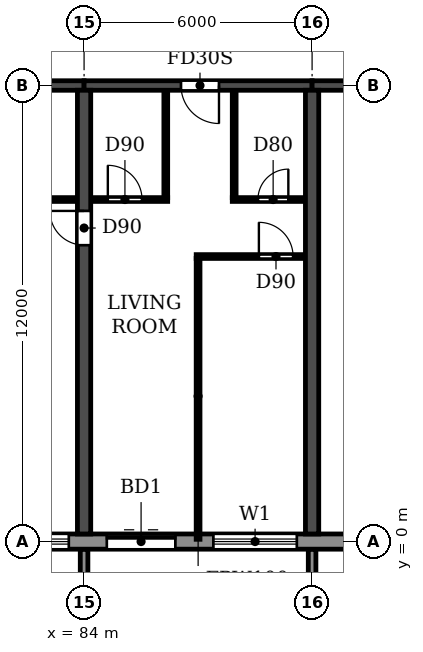
"""IFC4 building model, lengths in metres.
Left out: names, types, materials, properties, quantities, classifications, styles, units other than length and angle.
Written with IfcOpenShell. Run it as: python <this file> out.ifc"""

import sys

from ifc_helpers import new_model, si_unit, direction, frame, frame_2d, origin, place, context, subcontext, project, spatial, polyline, rectangle, outline, extrude, source, transform, mapped, element, fill, save


model = new_model("IFC4")
c1 = context("Model", 3, precision=1e-05, world=origin(), true_north=direction((0.0, 1.0)))
c2 = subcontext(c1, "Body", "Model", "MODEL_VIEW")
j1 = project(units=[si_unit("LENGTHUNIT", "METRE"), si_unit("PLANEANGLEUNIT", "RADIAN")], contexts=[c1])
p1 = place(None, origin())
s1 = spatial("IfcSite", under=j1, at=p1, CompositionType="ELEMENT")
p2 = place(p1, origin())
s2 = spatial("IfcBuilding", under=s1, at=p2, CompositionType="ELEMENT")
p3 = place(p2, frame((0.0, 0.0, 76.2)))
s3 = spatial("IfcBuildingStorey", under=s2, at=p3, CompositionType="ELEMENT", Elevation=76.2)
p4 = place(p3, frame((84.0, 0.2, 0.0), z_axis=(0.0, 0.0, 1.0), x_axis=(0.0, 1.0, 0.0)))
e1 = element("IfcWall", 1, at=p4, inside=s3, PredefinedType="SHEAR", context=c2, shape_type="SweptSolid", body=[
    extrude(rectangle(XDim=11.675, YDim=0.35, at=frame_2d((5.837, 0.0))), origin(), (0.0, 0.0, 1.0), 3.06),
])
p5 = place(p4, frame((7.6, 0.0, 0.0)))
e2 = element("IfcOpeningElement", 2, at=p5, cuts=e1, PredefinedType="OPENING", context=c2, shape_type="SweptSolid", body=[
    extrude(rectangle(XDim=0.9, YDim=2.1, at=frame_2d((0.45, 1.05))), frame((0.0, 0.185, 0.0), z_axis=(0.0, -1.0, 0.0), x_axis=(1.0, 0.0, 0.0)), (0.0, 0.0, 1.0), 0.37),
])
p6 = place(p3, frame((90.0, 0.2, 0.0), z_axis=(0.0, 0.0, 1.0), x_axis=(0.0, 1.0, 0.0)))
e3 = element("IfcWall", 3, at=p6, inside=s3, PredefinedType="SHEAR", context=c2, shape_type="SweptSolid", body=[
    extrude(rectangle(XDim=11.675, YDim=0.35, at=frame_2d((5.837, 0.0))), origin(), (0.0, 0.0, 1.0), 3.06),
])
p7 = place(p3, frame((78.0, 12.0, 0.0), z_axis=(0.0, 0.0, 1.0), x_axis=(1.0, 0.0, 0.0)))
e4 = element("IfcWall", 4, at=p7, inside=s3, PredefinedType="SHEAR", context=c2, shape_type="SweptSolid", body=[
    extrude(rectangle(XDim=6.0, YDim=0.25, at=frame_2d((3.0, 0.0))), origin(), (0.0, 0.0, 1.0), 2.46),
])
p8 = place(p3, frame((84.0, 12.0, 0.0), z_axis=(0.0, 0.0, 1.0), x_axis=(1.0, 0.0, 0.0)))
e5 = element("IfcWall", 5, at=p8, inside=s3, PredefinedType="SHEAR", context=c2, shape_type="SweptSolid", body=[
    extrude(rectangle(XDim=6.0, YDim=0.25, at=frame_2d((3.0, 0.0))), origin(), (0.0, 0.0, 1.0), 2.46),
])
p9 = place(p8, frame((2.55, 0.0, 0.0)))
e6 = element("IfcOpeningElement", 6, at=p9, cuts=e5, PredefinedType="OPENING", context=c2, shape_type="SweptSolid", body=[
    extrude(rectangle(XDim=1.0, YDim=2.1, at=frame_2d((0.5, 1.05))), frame((0.0, 0.135, 0.0), z_axis=(0.0, -1.0, 0.0), x_axis=(1.0, 0.0, 0.0)), (0.0, 0.0, 1.0), 0.27),
])
p10 = place(p3, frame((90.0, 12.0, 0.0), z_axis=(0.0, 0.0, 1.0), x_axis=(1.0, 0.0, 0.0)))
e7 = element("IfcWall", 7, at=p10, inside=s3, PredefinedType="SHEAR", context=c2, shape_type="SweptSolid", body=[
    extrude(rectangle(XDim=5.8, YDim=0.25, at=frame_2d((2.9, 0.0))), origin(), (0.0, 0.0, 1.0), 2.46),
])
p11 = place(p10, frame((2.5, 0.0, 0.0)))
e8 = element("IfcOpeningElement", 8, at=p11, cuts=e7, PredefinedType="OPENING", context=c2, shape_type="SweptSolid", body=[
    extrude(rectangle(XDim=1.0, YDim=2.1, at=frame_2d((0.5, 1.05))), frame((0.0, 0.135, 0.0), z_axis=(0.0, -1.0, 0.0), x_axis=(1.0, 0.0, 0.0)), (0.0, 0.0, 1.0), 0.27),
])
p12 = place(p3, frame((10.683, 0.0, 0.0), z_axis=(0.0, 0.0, 1.0), x_axis=(1.0, 0.0, 0.0)))
e9 = element("IfcWall", 9, at=p12, inside=s3, PredefinedType="STANDARD", context=c2, shape_type="SweptSolid", body=[
    extrude(rectangle(XDim=80.634, YDim=0.4, at=frame_2d((40.317, 0.0))), origin(), (0.0, 0.0, 1.0), 3.06),
])
p13 = place(p12, frame((1.717, 0.0, 0.9)))
e10 = element("IfcOpeningElement", 10, at=p13, cuts=e9, PredefinedType="OPENING", context=c2, shape_type="SweptSolid", body=[
    extrude(rectangle(XDim=2.2, YDim=1.5, at=frame_2d((1.1, 0.75))), frame((0.0, 0.21, 0.0), z_axis=(0.0, -1.0, 0.0), x_axis=(1.0, 0.0, 0.0)), (0.0, 0.0, 1.0), 0.42),
])
p14 = place(p12, frame((4.917, 0.0, 0.0)))
e11 = element("IfcOpeningElement", 11, at=p14, cuts=e9, PredefinedType="OPENING", context=c2, shape_type="SweptSolid", body=[
    extrude(rectangle(XDim=1.8, YDim=2.4, at=frame_2d((0.9, 1.2))), frame((0.0, 0.21, 0.0), z_axis=(0.0, -1.0, 0.0), x_axis=(1.0, 0.0, 0.0)), (0.0, 0.0, 1.0), 0.42),
])
p15 = place(p12, frame((7.717, 0.0, 0.9)))
e12 = element("IfcOpeningElement", 12, at=p15, cuts=e9, PredefinedType="OPENING", context=c2, shape_type="SweptSolid", body=[
    extrude(rectangle(XDim=2.2, YDim=1.5, at=frame_2d((1.1, 0.75))), frame((0.0, 0.21, 0.0), z_axis=(0.0, -1.0, 0.0), x_axis=(1.0, 0.0, 0.0)), (0.0, 0.0, 1.0), 0.42),
])
p16 = place(p12, frame((10.717, 0.0, 0.9)))
e13 = element("IfcOpeningElement", 13, at=p16, cuts=e9, PredefinedType="OPENING", context=c2, shape_type="SweptSolid", body=[
    extrude(rectangle(XDim=2.2, YDim=1.5, at=frame_2d((1.1, 0.75))), frame((0.0, 0.21, 0.0), z_axis=(0.0, -1.0, 0.0), x_axis=(1.0, 0.0, 0.0)), (0.0, 0.0, 1.0), 0.42),
])
p17 = place(p12, frame((13.717, 0.0, 0.9)))
e14 = element("IfcOpeningElement", 14, at=p17, cuts=e9, PredefinedType="OPENING", context=c2, shape_type="SweptSolid", body=[
    extrude(rectangle(XDim=2.2, YDim=1.5, at=frame_2d((1.1, 0.75))), frame((0.0, 0.21, 0.0), z_axis=(0.0, -1.0, 0.0), x_axis=(1.0, 0.0, 0.0)), (0.0, 0.0, 1.0), 0.42),
])
p18 = place(p12, frame((16.917, 0.0, 0.0)))
e15 = element("IfcOpeningElement", 15, at=p18, cuts=e9, PredefinedType="OPENING", context=c2, shape_type="SweptSolid", body=[
    extrude(rectangle(XDim=1.8, YDim=2.4, at=frame_2d((0.9, 1.2))), frame((0.0, 0.21, 0.0), z_axis=(0.0, -1.0, 0.0), x_axis=(1.0, 0.0, 0.0)), (0.0, 0.0, 1.0), 0.42),
])
p19 = place(p12, frame((19.717, 0.0, 0.9)))
e16 = element("IfcOpeningElement", 16, at=p19, cuts=e9, PredefinedType="OPENING", context=c2, shape_type="SweptSolid", body=[
    extrude(rectangle(XDim=2.2, YDim=1.5, at=frame_2d((1.1, 0.75))), frame((0.0, 0.21, 0.0), z_axis=(0.0, -1.0, 0.0), x_axis=(1.0, 0.0, 0.0)), (0.0, 0.0, 1.0), 0.42),
])
p20 = place(p12, frame((22.717, 0.0, 0.9)))
e17 = element("IfcOpeningElement", 17, at=p20, cuts=e9, PredefinedType="OPENING", context=c2, shape_type="SweptSolid", body=[
    extrude(rectangle(XDim=2.2, YDim=1.5, at=frame_2d((1.1, 0.75))), frame((0.0, 0.21, 0.0), z_axis=(0.0, -1.0, 0.0), x_axis=(1.0, 0.0, 0.0)), (0.0, 0.0, 1.0), 0.42),
])
p21 = place(p12, frame((25.917, 0.0, 0.0)))
e18 = element("IfcOpeningElement", 18, at=p21, cuts=e9, PredefinedType="OPENING", context=c2, shape_type="SweptSolid", body=[
    extrude(rectangle(XDim=1.8, YDim=2.4, at=frame_2d((0.9, 1.2))), frame((0.0, 0.21, 0.0), z_axis=(0.0, -1.0, 0.0), x_axis=(1.0, 0.0, 0.0)), (0.0, 0.0, 1.0), 0.42),
])
p22 = place(p12, frame((28.717, 0.0, 0.9)))
e19 = element("IfcOpeningElement", 19, at=p22, cuts=e9, PredefinedType="OPENING", context=c2, shape_type="SweptSolid", body=[
    extrude(rectangle(XDim=2.2, YDim=1.5, at=frame_2d((1.1, 0.75))), frame((0.0, 0.21, 0.0), z_axis=(0.0, -1.0, 0.0), x_axis=(1.0, 0.0, 0.0)), (0.0, 0.0, 1.0), 0.42),
])
p23 = place(p12, frame((31.717, 0.0, 0.9)))
e20 = element("IfcOpeningElement", 20, at=p23, cuts=e9, PredefinedType="OPENING", context=c2, shape_type="SweptSolid", body=[
    extrude(rectangle(XDim=2.2, YDim=1.5, at=frame_2d((1.1, 0.75))), frame((0.0, 0.21, 0.0), z_axis=(0.0, -1.0, 0.0), x_axis=(1.0, 0.0, 0.0)), (0.0, 0.0, 1.0), 0.42),
])
p24 = place(p12, frame((34.717, 0.0, 0.9)))
e21 = element("IfcOpeningElement", 21, at=p24, cuts=e9, PredefinedType="OPENING", context=c2, shape_type="SweptSolid", body=[
    extrude(rectangle(XDim=2.2, YDim=1.5, at=frame_2d((1.1, 0.75))), frame((0.0, 0.21, 0.0), z_axis=(0.0, -1.0, 0.0), x_axis=(1.0, 0.0, 0.0)), (0.0, 0.0, 1.0), 0.42),
])
p25 = place(p12, frame((37.917, 0.0, 0.0)))
e22 = element("IfcOpeningElement", 22, at=p25, cuts=e9, PredefinedType="OPENING", context=c2, shape_type="SweptSolid", body=[
    extrude(rectangle(XDim=1.8, YDim=2.4, at=frame_2d((0.9, 1.2))), frame((0.0, 0.21, 0.0), z_axis=(0.0, -1.0, 0.0), x_axis=(1.0, 0.0, 0.0)), (0.0, 0.0, 1.0), 0.42),
])
p26 = place(p12, frame((40.717, 0.0, 0.9)))
e23 = element("IfcOpeningElement", 23, at=p26, cuts=e9, PredefinedType="OPENING", context=c2, shape_type="SweptSolid", body=[
    extrude(rectangle(XDim=2.2, YDim=1.5, at=frame_2d((1.1, 0.75))), frame((0.0, 0.21, 0.0), z_axis=(0.0, -1.0, 0.0), x_axis=(1.0, 0.0, 0.0)), (0.0, 0.0, 1.0), 0.42),
])
p27 = place(p12, frame((43.717, 0.0, 0.9)))
e24 = element("IfcOpeningElement", 24, at=p27, cuts=e9, PredefinedType="OPENING", context=c2, shape_type="SweptSolid", body=[
    extrude(rectangle(XDim=2.2, YDim=1.5, at=frame_2d((1.1, 0.75))), frame((0.0, 0.21, 0.0), z_axis=(0.0, -1.0, 0.0), x_axis=(1.0, 0.0, 0.0)), (0.0, 0.0, 1.0), 0.42),
])
p28 = place(p12, frame((46.717, 0.0, 0.9)))
e25 = element("IfcOpeningElement", 25, at=p28, cuts=e9, PredefinedType="OPENING", context=c2, shape_type="SweptSolid", body=[
    extrude(rectangle(XDim=2.2, YDim=1.5, at=frame_2d((1.1, 0.75))), frame((0.0, 0.21, 0.0), z_axis=(0.0, -1.0, 0.0), x_axis=(1.0, 0.0, 0.0)), (0.0, 0.0, 1.0), 0.42),
])
p29 = place(p12, frame((49.917, 0.0, 0.0)))
e26 = element("IfcOpeningElement", 26, at=p29, cuts=e9, PredefinedType="OPENING", context=c2, shape_type="SweptSolid", body=[
    extrude(rectangle(XDim=1.8, YDim=2.4, at=frame_2d((0.9, 1.2))), frame((0.0, 0.21, 0.0), z_axis=(0.0, -1.0, 0.0), x_axis=(1.0, 0.0, 0.0)), (0.0, 0.0, 1.0), 0.42),
])
p30 = place(p12, frame((52.717, 0.0, 0.9)))
e27 = element("IfcOpeningElement", 27, at=p30, cuts=e9, PredefinedType="OPENING", context=c2, shape_type="SweptSolid", body=[
    extrude(rectangle(XDim=2.2, YDim=1.5, at=frame_2d((1.1, 0.75))), frame((0.0, 0.21, 0.0), z_axis=(0.0, -1.0, 0.0), x_axis=(1.0, 0.0, 0.0)), (0.0, 0.0, 1.0), 0.42),
])
p31 = place(p12, frame((55.717, 0.0, 0.9)))
e28 = element("IfcOpeningElement", 28, at=p31, cuts=e9, PredefinedType="OPENING", context=c2, shape_type="SweptSolid", body=[
    extrude(rectangle(XDim=2.2, YDim=1.5, at=frame_2d((1.1, 0.75))), frame((0.0, 0.21, 0.0), z_axis=(0.0, -1.0, 0.0), x_axis=(1.0, 0.0, 0.0)), (0.0, 0.0, 1.0), 0.42),
])
p32 = place(p12, frame((58.717, 0.0, 0.9)))
e29 = element("IfcOpeningElement", 29, at=p32, cuts=e9, PredefinedType="OPENING", context=c2, shape_type="SweptSolid", body=[
    extrude(rectangle(XDim=2.2, YDim=1.5, at=frame_2d((1.1, 0.75))), frame((0.0, 0.21, 0.0), z_axis=(0.0, -1.0, 0.0), x_axis=(1.0, 0.0, 0.0)), (0.0, 0.0, 1.0), 0.42),
])
p33 = place(p12, frame((61.717, 0.0, 0.9)))
e30 = element("IfcOpeningElement", 30, at=p33, cuts=e9, PredefinedType="OPENING", context=c2, shape_type="SweptSolid", body=[
    extrude(rectangle(XDim=2.2, YDim=1.5, at=frame_2d((1.1, 0.75))), frame((0.0, 0.21, 0.0), z_axis=(0.0, -1.0, 0.0), x_axis=(1.0, 0.0, 0.0)), (0.0, 0.0, 1.0), 0.42),
])
p34 = place(p12, frame((64.917, 0.0, 0.0)))
e31 = element("IfcOpeningElement", 31, at=p34, cuts=e9, PredefinedType="OPENING", context=c2, shape_type="SweptSolid", body=[
    extrude(rectangle(XDim=1.8, YDim=2.4, at=frame_2d((0.9, 1.2))), frame((0.0, 0.21, 0.0), z_axis=(0.0, -1.0, 0.0), x_axis=(1.0, 0.0, 0.0)), (0.0, 0.0, 1.0), 0.42),
])
p35 = place(p12, frame((67.717, 0.0, 0.9)))
e32 = element("IfcOpeningElement", 32, at=p35, cuts=e9, PredefinedType="OPENING", context=c2, shape_type="SweptSolid", body=[
    extrude(rectangle(XDim=2.2, YDim=1.5, at=frame_2d((1.1, 0.75))), frame((0.0, 0.21, 0.0), z_axis=(0.0, -1.0, 0.0), x_axis=(1.0, 0.0, 0.0)), (0.0, 0.0, 1.0), 0.42),
])
p36 = place(p12, frame((70.717, 0.0, 0.9)))
e33 = element("IfcOpeningElement", 33, at=p36, cuts=e9, PredefinedType="OPENING", context=c2, shape_type="SweptSolid", body=[
    extrude(rectangle(XDim=2.2, YDim=1.5, at=frame_2d((1.1, 0.75))), frame((0.0, 0.21, 0.0), z_axis=(0.0, -1.0, 0.0), x_axis=(1.0, 0.0, 0.0)), (0.0, 0.0, 1.0), 0.42),
])
p37 = place(p12, frame((73.917, 0.0, 0.0)))
e34 = element("IfcOpeningElement", 34, at=p37, cuts=e9, PredefinedType="OPENING", context=c2, shape_type="SweptSolid", body=[
    extrude(rectangle(XDim=1.8, YDim=2.4, at=frame_2d((0.9, 1.2))), frame((0.0, 0.21, 0.0), z_axis=(0.0, -1.0, 0.0), x_axis=(1.0, 0.0, 0.0)), (0.0, 0.0, 1.0), 0.42),
])
p38 = place(p12, frame((76.717, 0.0, 0.9)))
e35 = element("IfcOpeningElement", 35, at=p38, cuts=e9, PredefinedType="OPENING", context=c2, shape_type="SweptSolid", body=[
    extrude(rectangle(XDim=2.2, YDim=1.5, at=frame_2d((1.1, 0.75))), frame((0.0, 0.21, 0.0), z_axis=(0.0, -1.0, 0.0), x_axis=(1.0, 0.0, 0.0)), (0.0, 0.0, 1.0), 0.42),
])
m1 = source(origin(), c2, "Body", "SweptSolid", [
    extrude(outline(polyline([(0.0, 0.0), (0.2, 0.0), (0.2, 1.65), (0.0, 1.65), (0.0, 0.0)])), origin(), (0.0, 0.0, 1.0), 3.1),
])
for number, where in (
    (36, (83.9, -1.85, 0.0)),
    (37, (89.9, -1.85, 0.0)),
):
    element("IfcWall", number, at=place(p3, frame(where)), inside=s3, PredefinedType="STANDARD", context=c2, shape_type="MappedRepresentation", body=[
        mapped(m1, transform((0.0, 0.0, 0.0))),
    ])
p39 = place(p3, frame((86.95, 7.5, 0.0), z_axis=(0.0, 0.0, 1.0), x_axis=(1.0, 0.0, 0.0)))
e38 = element("IfcWall", 38, at=p39, inside=s3, PredefinedType="PARTITIONING", context=c2, shape_type="SweptSolid", body=[
    extrude(rectangle(XDim=2.865, YDim=0.1, at=frame_2d((1.433, 0.0))), origin(), (0.0, 0.0, 1.0), 3.06),
])
p40 = place(p39, frame((1.65, 0.0, 0.0)))
e39 = element("IfcOpeningElement", 39, at=p40, cuts=e38, PredefinedType="OPENING", context=c2, shape_type="SweptSolid", body=[
    extrude(rectangle(XDim=0.9, YDim=2.1, at=frame_2d((0.45, 1.05))), frame((0.0, 0.06, 0.0), z_axis=(0.0, -1.0, 0.0), x_axis=(1.0, 0.0, 0.0)), (0.0, 0.0, 1.0), 0.12),
])
p41 = place(p3, frame((81.1, 9.0, 0.0), z_axis=(0.0, 0.0, 1.0), x_axis=(1.0, 0.0, 0.0)))
e40 = element("IfcWall", 40, at=p41, inside=s3, PredefinedType="PARTITIONING", context=c2, shape_type="SweptSolid", body=[
    extrude(rectangle(XDim=2.715, YDim=0.1, at=frame_2d((1.357, 0.0))), origin(), (0.0, 0.0, 1.0), 3.06),
])
p42 = place(p41, frame((1.0, 0.0, 0.0)))
e41 = element("IfcOpeningElement", 41, at=p42, cuts=e40, PredefinedType="OPENING", context=c2, shape_type="SweptSolid", body=[
    extrude(rectangle(XDim=0.8, YDim=2.1, at=frame_2d((0.4, 1.05))), frame((0.0, 0.06, 0.0), z_axis=(0.0, -1.0, 0.0), x_axis=(1.0, 0.0, 0.0)), (0.0, 0.0, 1.0), 0.12),
])
p43 = place(p3, frame((84.185, 9.0, 0.0), z_axis=(0.0, 0.0, 1.0), x_axis=(1.0, 0.0, 0.0)))
e42 = element("IfcWall", 42, at=p43, inside=s3, PredefinedType="PARTITIONING", context=c2, shape_type="SweptSolid", body=[
    extrude(rectangle(XDim=2.015, YDim=0.1, at=frame_2d((1.007, 0.0))), origin(), (0.0, 0.0, 1.0), 3.06),
])
p44 = place(p43, frame((0.44, 0.0, 0.0)))
e43 = element("IfcOpeningElement", 43, at=p44, cuts=e42, PredefinedType="OPENING", context=c2, shape_type="SweptSolid", body=[
    extrude(rectangle(XDim=0.9, YDim=2.1, at=frame_2d((0.45, 1.05))), frame((0.0, 0.06, 0.0), z_axis=(0.0, -1.0, 0.0), x_axis=(1.0, 0.0, 0.0)), (0.0, 0.0, 1.0), 0.12),
])
p45 = place(p3, frame((87.9, 9.0, 0.0), z_axis=(0.0, 0.0, 1.0), x_axis=(1.0, 0.0, 0.0)))
e44 = element("IfcWall", 44, at=p45, inside=s3, PredefinedType="PARTITIONING", context=c2, shape_type="SweptSolid", body=[
    extrude(rectangle(XDim=1.915, YDim=0.1, at=frame_2d((0.958, 0.0))), origin(), (0.0, 0.0, 1.0), 3.06),
])
p46 = place(p45, frame((0.675, 0.0, 0.0)))
e45 = element("IfcOpeningElement", 45, at=p46, cuts=e44, PredefinedType="OPENING", context=c2, shape_type="SweptSolid", body=[
    extrude(rectangle(XDim=0.8, YDim=2.1, at=frame_2d((0.4, 1.05))), frame((0.0, 0.06, 0.0), z_axis=(0.0, -1.0, 0.0), x_axis=(1.0, 0.0, 0.0)), (0.0, 0.0, 1.0), 0.12),
])
p47 = place(p3, frame((86.15, 9.05, 0.0), z_axis=(0.0, 0.0, 1.0), x_axis=(0.0, 1.0, 0.0)))
e46 = element("IfcWall", 46, at=p47, inside=s3, PredefinedType="PARTITIONING", context=c2, shape_type="SweptSolid", body=[
    extrude(rectangle(XDim=2.815, YDim=0.1, at=frame_2d((1.407, 0.0))), origin(), (0.0, 0.0, 1.0), 3.06),
])
p48 = place(p3, frame((87.0, 0.06, 0.0), z_axis=(0.0, 0.0, 1.0), x_axis=(0.0, 1.0, 0.0)))
e47 = element("IfcWall", 47, at=p48, inside=s3, PredefinedType="PARTITIONING", context=c2, shape_type="SweptSolid", body=[
    extrude(rectangle(XDim=7.39, YDim=0.1, at=frame_2d((3.695, 0.0))), origin(), (0.0, 0.0, 1.0), 3.06),
])
p49 = place(p3, frame((87.95, 9.05, 0.0), z_axis=(0.0, 0.0, 1.0), x_axis=(0.0, 1.0, 0.0)))
e48 = element("IfcWall", 48, at=p49, inside=s3, PredefinedType="PARTITIONING", context=c2, shape_type="SweptSolid", body=[
    extrude(rectangle(XDim=2.815, YDim=0.1, at=frame_2d((1.407, 0.0))), origin(), (0.0, 0.0, 1.0), 3.06),
])
p50 = place(p36, origin())
e49 = element("IfcWindow", 49, at=p50, inside=s3, PartitioningType="DOUBLE_PANEL_HORIZONTAL", PredefinedType="WINDOW", context=c2, shape_type="SweptSolid", body=[
    extrude(rectangle(XDim=2.2, YDim=1.5, at=frame_2d((1.1, 0.75))), frame((0.0, 0.03, 0.0), z_axis=(0.0, -1.0, 0.0), x_axis=(1.0, 0.0, 0.0)), (0.0, 0.0, 1.0), 0.06),
])
fill(e33, e49)
p51 = place(p37, origin())
e50 = element("IfcDoor", 50, at=p51, inside=s3, OperationType="DOUBLE_DOOR_SLIDING", PredefinedType="DOOR", context=c2, shape_type="SweptSolid", body=[
    extrude(rectangle(XDim=1.8, YDim=2.4, at=frame_2d((0.9, 1.2))), frame((0.0, 0.025, 0.0), z_axis=(0.0, -1.0, 0.0), x_axis=(1.0, 0.0, 0.0)), (0.0, 0.0, 1.0), 0.05),
])
fill(e34, e50)
p52 = place(p38, origin())
e51 = element("IfcWindow", 51, at=p52, inside=s3, PartitioningType="DOUBLE_PANEL_HORIZONTAL", PredefinedType="WINDOW", context=c2, shape_type="SweptSolid", body=[
    extrude(rectangle(XDim=2.2, YDim=1.5, at=frame_2d((1.1, 0.75))), frame((0.0, 0.03, 0.0), z_axis=(0.0, -1.0, 0.0), x_axis=(1.0, 0.0, 0.0)), (0.0, 0.0, 1.0), 0.06),
])
fill(e35, e51)
p53 = place(p5, origin())
e52 = element("IfcDoor", 52, at=p53, inside=s3, OperationType="SINGLE_SWING_RIGHT", PredefinedType="DOOR", context=c2, shape_type="SweptSolid", body=[
    extrude(rectangle(XDim=0.9, YDim=2.1, at=frame_2d((0.45, 1.05))), frame((0.0, 0.025, 0.0), z_axis=(0.0, -1.0, 0.0), x_axis=(1.0, 0.0, 0.0)), (0.0, 0.0, 1.0), 0.05),
])
fill(e2, e52)
p54 = place(p44, origin())
e53 = element("IfcDoor", 53, at=p54, inside=s3, OperationType="SINGLE_SWING_LEFT", PredefinedType="DOOR", context=c2, shape_type="SweptSolid", body=[
    extrude(rectangle(XDim=0.9, YDim=2.1, at=frame_2d((0.45, 1.05))), frame((0.0, 0.025, 0.0), z_axis=(0.0, -1.0, 0.0), x_axis=(1.0, 0.0, 0.0)), (0.0, 0.0, 1.0), 0.05),
])
fill(e43, e53)
p55 = place(p9, frame((1.0, 0.0, 0.0), z_axis=(0.0, 0.0, 1.0), x_axis=(-1.0, 0.0, 0.0)))
e54 = element("IfcDoor", 54, at=p55, inside=s3, OperationType="SINGLE_SWING_LEFT", PredefinedType="DOOR", context=c2, shape_type="SweptSolid", body=[
    extrude(rectangle(XDim=1.0, YDim=2.1, at=frame_2d((0.5, 1.05))), frame((0.0, 0.025, 0.0), z_axis=(0.0, -1.0, 0.0), x_axis=(1.0, 0.0, 0.0)), (0.0, 0.0, 1.0), 0.05),
])
fill(e6, e54)
p56 = place(p46, origin())
e55 = element("IfcDoor", 55, at=p56, inside=s3, OperationType="SINGLE_SWING_RIGHT", PredefinedType="DOOR", context=c2, shape_type="SweptSolid", body=[
    extrude(rectangle(XDim=0.8, YDim=2.1, at=frame_2d((0.4, 1.05))), frame((0.0, 0.025, 0.0), z_axis=(0.0, -1.0, 0.0), x_axis=(1.0, 0.0, 0.0)), (0.0, 0.0, 1.0), 0.05),
])
fill(e45, e55)
p57 = place(p40, origin())
e56 = element("IfcDoor", 56, at=p57, inside=s3, OperationType="SINGLE_SWING_LEFT", PredefinedType="DOOR", context=c2, shape_type="SweptSolid", body=[
    extrude(rectangle(XDim=0.9, YDim=2.1, at=frame_2d((0.45, 1.05))), frame((0.0, 0.025, 0.0), z_axis=(0.0, -1.0, 0.0), x_axis=(1.0, 0.0, 0.0)), (0.0, 0.0, 1.0), 0.05),
])
fill(e39, e56)
save(model, sys.argv[1])
